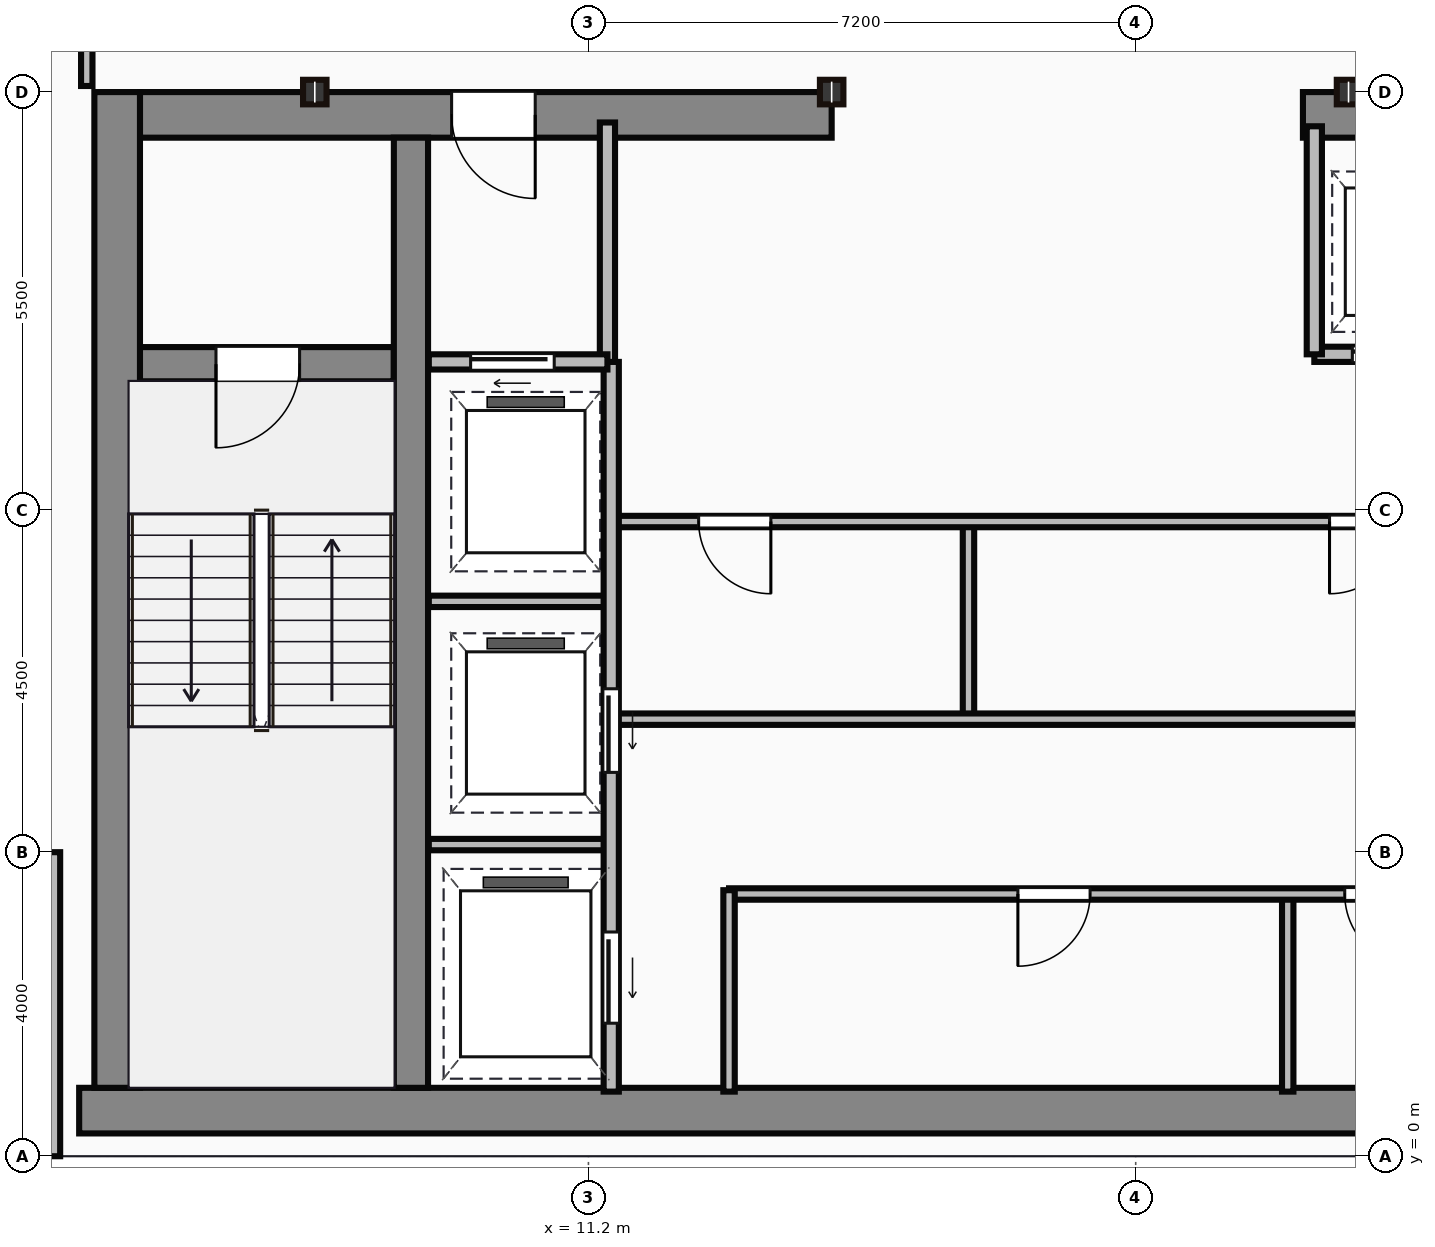
"""IFC4 building model, lengths in metres.
Left out: names, types, materials, properties, quantities, classifications, styles, units other than length and angle.
Written with IfcOpenShell. Run it as: python <this file> out.ifc"""

import sys

from ifc_helpers import new_model, si_unit, direction, frame, frame_2d, origin, origin_2d, place, context, subcontext, project, spatial, rectangle, i_section, extrude, source, transform, mapped, element, fill, save


model = new_model("IFC4")
c1 = context("Model", 3, precision=1e-05, world=origin(), true_north=direction((0.0, 1.0)))
c2 = subcontext(c1, "Body", "Model", "MODEL_VIEW")
j1 = project(units=[si_unit("LENGTHUNIT", "METRE"), si_unit("PLANEANGLEUNIT", "RADIAN")], contexts=[c1])
p1 = place(None, origin())
s1 = spatial("IfcSite", under=j1, at=p1, CompositionType="ELEMENT")
p2 = place(p1, origin())
s2 = spatial("IfcBuilding", under=s1, at=p2, CompositionType="ELEMENT")
p3 = place(p2, frame((0.0, 0.0, 199.55)))
s3 = spatial("IfcBuildingStorey", under=s2, at=p3, CompositionType="ELEMENT", Elevation=199.55)
m1 = source(origin(), c2, "Body", "SweptSolid", [
    extrude(rectangle(XDim=29.5, YDim=0.6, at=frame_2d((14.75, 0.0))), origin(), (0.0, 0.0, 1.0), 3.65),
])
p4 = place(p3, frame((4.5, 0.6, 0.0), z_axis=(0.0, 0.0, 1.0), x_axis=(1.0, 0.0, 0.0)))
e1 = element("IfcWall", 1, at=p4, inside=s3, PredefinedType="SHEAR", context=c2, shape_type="MappedRepresentation", body=[
    mapped(m1, transform((0.0, 0.0, 0.0))),
])
m2 = source(origin(), c2, "Body", "SweptSolid", [
    extrude(rectangle(XDim=13.1, YDim=0.6, at=frame_2d((6.55, 0.0))), origin(), (0.0, 0.0, 1.0), 3.65),
])
p5 = place(p3, frame((5.0, 0.9, 0.0), z_axis=(0.0, 0.0, 1.0), x_axis=(0.0, 1.0, 0.0)))
e2 = element("IfcWall", 2, at=p5, inside=s3, PredefinedType="SHEAR", context=c2, shape_type="MappedRepresentation", body=[
    mapped(m2, transform((0.0, 0.0, 0.0))),
])
m3 = source(origin(), c2, "Body", "SweptSolid", [
    extrude(rectangle(XDim=9.1, YDim=0.6, at=frame_2d((4.55, 0.0))), origin(), (0.0, 0.0, 1.0), 3.65),
])
p6 = place(p3, frame((5.3, 13.7, 0.0), z_axis=(0.0, 0.0, 1.0), x_axis=(1.0, 0.0, 0.0)))
e3 = element("IfcWall", 3, at=p6, inside=s3, PredefinedType="SHEAR", context=c2, shape_type="MappedRepresentation", body=[
    mapped(m3, transform((0.0, 0.0, 0.0))),
])
p7 = place(p6, frame((4.1, 0.0, 0.0)))
e4 = element("IfcOpeningElement", 4, at=p7, cuts=e3, PredefinedType="OPENING", context=c2, shape_type="SweptSolid", body=[
    extrude(rectangle(XDim=1.1, YDim=2.15, at=frame_2d((0.55, 1.075))), frame((0.0, 0.31, 0.0), z_axis=(0.0, -1.0, 0.0), x_axis=(1.0, 0.0, 0.0)), (0.0, 0.0, 1.0), 0.62),
])
m4 = source(origin(), c2, "Body", "SweptSolid", [
    extrude(rectangle(XDim=12.6, YDim=0.6, at=frame_2d((6.3, 0.0))), origin(), (0.0, 0.0, 1.0), 3.65),
])
p8 = place(p3, frame((20.6, 13.7, 0.0), z_axis=(0.0, 0.0, 1.0), x_axis=(1.0, 0.0, 0.0)))
e5 = element("IfcWall", 5, at=p8, inside=s3, PredefinedType="SHEAR", context=c2, shape_type="MappedRepresentation", body=[
    mapped(m4, transform((0.0, 0.0, 0.0))),
])
p9 = place(p8, frame((9.25, 0.0, 0.0)))
e6 = element("IfcOpeningElement", 6, at=p9, cuts=e5, PredefinedType="OPENING", context=c2, shape_type="SweptSolid", body=[
    extrude(rectangle(XDim=1.1, YDim=2.15, at=frame_2d((0.55, 1.075))), frame((0.0, 0.31, 0.0), z_axis=(0.0, -1.0, 0.0), x_axis=(1.0, 0.0, 0.0)), (0.0, 0.0, 1.0), 0.62),
])
m5 = source(origin(), c2, "Body", "SweptSolid", [
    extrude(rectangle(XDim=12.5, YDim=0.45, at=frame_2d((6.25, 0.0))), origin(), (0.0, 0.0, 1.0), 3.65),
])
p10 = place(p3, frame((8.865, 0.9, 0.0), z_axis=(0.0, 0.0, 1.0), x_axis=(0.0, 1.0, 0.0)))
e7 = element("IfcWall", 7, at=p10, inside=s3, PredefinedType="SHEAR", context=c2, shape_type="MappedRepresentation", body=[
    mapped(m5, transform((0.0, 0.0, 0.0))),
])
m6 = source(origin(), c2, "Body", "SweptSolid", [
    extrude(rectangle(XDim=3.39, YDim=0.45, at=frame_2d((1.695, 0.0))), origin(), (0.0, 0.0, 1.0), 3.65),
])
p11 = place(p3, frame((5.25, 10.42, 0.0), z_axis=(0.0, 0.0, 1.0), x_axis=(1.0, 0.0, 0.0)))
e8 = element("IfcWall", 8, at=p11, inside=s3, PredefinedType="SHEAR", context=c2, shape_type="MappedRepresentation", body=[
    mapped(m6, transform((0.0, 0.0, 0.0))),
])
p12 = place(p11, frame((1.05, 0.0, 0.0)))
e9 = element("IfcOpeningElement", 9, at=p12, cuts=e8, PredefinedType="OPENING", context=c2, shape_type="SweptSolid", body=[
    extrude(rectangle(XDim=1.1, YDim=2.15, at=frame_2d((0.55, 1.075))), frame((0.0, 0.235, 0.0), z_axis=(0.0, -1.0, 0.0), x_axis=(1.0, 0.0, 0.0)), (0.0, 0.0, 1.0), 0.47),
])
m7 = source(origin(), c2, "Body", "SweptSolid", [
    extrude(i_section(OverallWidth=0.309, OverallDepth=0.323, WebThickness=0.014, FlangeThickness=0.023, at=origin_2d()), origin(), (0.0, 0.0, 1.0), 3.65),
])
for number, where, z_axis, x_axis in (
    (10, (7.6, 14.0, 0.0), (0.0, 0.0, 1.0), (1.0, 0.0, 0.0)),
    (11, (14.4, 14.0, 0.0), (0.0, 0.0, 1.0), (1.0, 0.0, 0.0)),
    (12, (21.2, 14.0, 0.0), (0.0, 0.0, 1.0), (1.0, 0.0, 0.0)),
):
    element("IfcColumn", number, at=place(p3, frame(where, z_axis=z_axis, x_axis=x_axis)), inside=s3, PredefinedType="COLUMN", context=c2, shape_type="MappedRepresentation", body=[
        mapped(m7, transform((0.0, 0.0, 0.0))),
    ])
m8 = source(origin(), c2, "Body", "SweptSolid", [
    extrude(rectangle(XDim=4.0, YDim=0.25, at=frame_2d((2.0, 0.0))), origin(), (0.0, 0.0, 1.0), 3.4),
])
p13 = place(p3, frame((4.125, 4.0, 0.0), z_axis=(0.0, 0.0, 1.0), x_axis=(0.0, -1.0, 0.0)))
e13 = element("IfcWall", 13, at=p13, inside=s3, PredefinedType="STANDARD", context=c2, shape_type="MappedRepresentation", body=[
    mapped(m8, transform((0.0, 0.0, 0.0))),
])
m9 = source(origin(), c2, "Body", "SweptSolid", [
    extrude(rectangle(XDim=3.18, YDim=0.2, at=frame_2d((1.59, 0.0))), origin(), (0.0, 0.0, 1.0), 3.4),
])
p14 = place(p3, frame((11.45, 10.42, 0.0), z_axis=(0.0, 0.0, 1.0), x_axis=(0.0, 1.0, 0.0)))
e14 = element("IfcWall", 14, at=p14, inside=s3, PredefinedType="PARTITIONING", context=c2, shape_type="MappedRepresentation", body=[
    mapped(m9, transform((0.0, 0.0, 0.0))),
])
m10 = source(origin(), c2, "Body", "SweptSolid", [
    extrude(rectangle(XDim=2.35, YDim=0.2, at=frame_2d((1.175, 0.0))), origin(), (0.0, 0.0, 1.0), 3.4),
])
p15 = place(p3, frame((9.1, 10.45, 0.0), z_axis=(0.0, 0.0, 1.0), x_axis=(1.0, 0.0, 0.0)))
e15 = element("IfcWall", 15, at=p15, inside=s3, PredefinedType="PARTITIONING", context=c2, shape_type="MappedRepresentation", body=[
    mapped(m10, transform((0.0, 0.0, 0.0))),
])
p16 = place(p15, frame((0.55, 0.0, 0.0)))
e16 = element("IfcOpeningElement", 16, at=p16, cuts=e15, PredefinedType="OPENING", context=c2, shape_type="SweptSolid", body=[
    extrude(rectangle(XDim=1.1, YDim=2.15, at=frame_2d((0.55, 1.075))), frame((0.0, 0.11, 0.0), z_axis=(0.0, -1.0, 0.0), x_axis=(1.0, 0.0, 0.0)), (0.0, 0.0, 1.0), 0.22),
])
m11 = source(origin(), c2, "Body", "SweptSolid", [
    extrude(rectangle(XDim=9.6, YDim=0.2, at=frame_2d((4.8, 0.0))), origin(), (0.0, 0.0, 1.0), 3.4),
])
p17 = place(p3, frame((11.5, 0.85, 0.0), z_axis=(0.0, 0.0, 1.0), x_axis=(0.0, 1.0, 0.0)))
e17 = element("IfcWall", 17, at=p17, inside=s3, PredefinedType="PARTITIONING", context=c2, shape_type="MappedRepresentation", body=[
    mapped(m11, transform((0.0, 0.0, 0.0))),
])
p18 = place(p17, frame((4.2, 0.0, 0.0)))
e18 = element("IfcOpeningElement", 18, at=p18, cuts=e17, PredefinedType="OPENING", context=c2, shape_type="SweptSolid", body=[
    extrude(rectangle(XDim=1.1, YDim=2.15, at=frame_2d((0.55, 1.075))), frame((0.0, 0.11, 0.0), z_axis=(0.0, -1.0, 0.0), x_axis=(1.0, 0.0, 0.0)), (0.0, 0.0, 1.0), 0.22),
])
p19 = place(p17, frame((0.9, 0.0, 0.0)))
e19 = element("IfcOpeningElement", 19, at=p19, cuts=e17, PredefinedType="OPENING", context=c2, shape_type="SweptSolid", body=[
    extrude(rectangle(XDim=1.2, YDim=2.15, at=frame_2d((0.6, 1.075))), frame((0.0, 0.11, 0.0), z_axis=(0.0, -1.0, 0.0), x_axis=(1.0, 0.0, 0.0)), (0.0, 0.0, 1.0), 0.22),
])
m12 = source(origin(), c2, "Body", "SweptSolid", [
    extrude(rectangle(XDim=2.4, YDim=0.15, at=frame_2d((1.2, 0.0))), origin(), (0.0, 0.0, 1.0), 3.4),
])
for number, where, z_axis, x_axis in (
    (20, (9.1, 4.1, 0.0), (0.0, 0.0, 1.0), (1.0, 0.0, 0.0)),
    (21, (9.1, 7.3, 0.0), (0.0, 0.0, 1.0), (1.0, 0.0, 0.0)),
):
    element("IfcWall", number, at=place(p3, frame(where, z_axis=z_axis, x_axis=x_axis)), inside=s3, PredefinedType="PARTITIONING", context=c2, shape_type="MappedRepresentation", body=[
        mapped(m12, transform((0.0, 0.0, 0.0))),
    ])
m13 = source(origin(), c2, "Body", "SweptSolid", [
    extrude(rectangle(XDim=2.65, YDim=0.15, at=frame_2d((1.325, 0.0))), origin(), (0.0, 0.0, 1.0), 3.4),
])
p20 = place(p3, frame((13.05, 0.85, 0.0), z_axis=(0.0, 0.0, 1.0), x_axis=(0.0, 1.0, 0.0)))
e22 = element("IfcWall", 22, at=p20, inside=s3, PredefinedType="PARTITIONING", context=c2, shape_type="MappedRepresentation", body=[
    mapped(m13, transform((0.0, 0.0, 0.0))),
])
m14 = source(origin(), c2, "Body", "SweptSolid", [
    extrude(rectangle(XDim=10.35, YDim=0.15, at=frame_2d((5.175, 0.0))), origin(), (0.0, 0.0, 1.0), 3.4),
])
p21 = place(p3, frame((13.05, 3.45, 0.0), z_axis=(0.0, 0.0, 1.0), x_axis=(1.0, 0.0, 0.0)))
e23 = element("IfcWall", 23, at=p21, inside=s3, PredefinedType="PARTITIONING", context=c2, shape_type="MappedRepresentation", body=[
    mapped(m14, transform((0.0, 0.0, 0.0))),
])
p22 = place(p21, frame((3.8, 0.0, 0.0)))
e24 = element("IfcOpeningElement", 24, at=p22, cuts=e23, PredefinedType="OPENING", context=c2, shape_type="SweptSolid", body=[
    extrude(rectangle(XDim=0.95, YDim=2.15, at=frame_2d((0.475, 1.075))), frame((0.0, 0.085, 0.0), z_axis=(0.0, -1.0, 0.0), x_axis=(1.0, 0.0, 0.0)), (0.0, 0.0, 1.0), 0.17),
])
p23 = place(p21, frame((8.1, 0.0, 0.0)))
e25 = element("IfcOpeningElement", 25, at=p23, cuts=e23, PredefinedType="OPENING", context=c2, shape_type="SweptSolid", body=[
    extrude(rectangle(XDim=0.95, YDim=2.15, at=frame_2d((0.475, 1.075))), frame((0.0, 0.085, 0.0), z_axis=(0.0, -1.0, 0.0), x_axis=(1.0, 0.0, 0.0)), (0.0, 0.0, 1.0), 0.17),
])
m15 = source(origin(), c2, "Body", "SweptSolid", [
    extrude(rectangle(XDim=2.6, YDim=0.15, at=frame_2d((1.3, 0.0))), origin(), (0.0, 0.0, 1.0), 3.4),
])
p24 = place(p3, frame((20.4, 0.85, 0.0), z_axis=(0.0, 0.0, 1.0), x_axis=(0.0, 1.0, 0.0)))
e26 = element("IfcWall", 26, at=p24, inside=s3, PredefinedType="PARTITIONING", context=c2, shape_type="MappedRepresentation", body=[
    mapped(m15, transform((0.0, 0.0, 0.0))),
])
m16 = source(origin(), c2, "Body", "SweptSolid", [
    extrude(rectangle(XDim=11.85, YDim=0.15, at=frame_2d((5.925, 0.0))), origin(), (0.0, 0.0, 1.0), 3.4),
])
p25 = place(p3, frame((11.55, 5.75, 0.0), z_axis=(0.0, 0.0, 1.0), x_axis=(1.0, 0.0, 0.0)))
e27 = element("IfcWall", 27, at=p25, inside=s3, PredefinedType="PARTITIONING", context=c2, shape_type="MappedRepresentation", body=[
    mapped(m16, transform((0.0, 0.0, 0.0))),
])
p26 = place(p3, frame((11.55, 8.35, 0.0), z_axis=(0.0, 0.0, 1.0), x_axis=(1.0, 0.0, 0.0)))
e28 = element("IfcWall", 28, at=p26, inside=s3, PredefinedType="PARTITIONING", context=c2, shape_type="MappedRepresentation", body=[
    mapped(m16, transform((0.0, 0.0, 0.0))),
])
p27 = place(p26, frame((1.1, 0.0, 0.0)))
e29 = element("IfcOpeningElement", 29, at=p27, cuts=e28, PredefinedType="OPENING", context=c2, shape_type="SweptSolid", body=[
    extrude(rectangle(XDim=0.95, YDim=2.15, at=frame_2d((0.475, 1.075))), frame((0.0, 0.085, 0.0), z_axis=(0.0, -1.0, 0.0), x_axis=(1.0, 0.0, 0.0)), (0.0, 0.0, 1.0), 0.17),
])
p28 = place(p26, frame((9.4, 0.0, 0.0)))
e30 = element("IfcOpeningElement", 30, at=p28, cuts=e28, PredefinedType="OPENING", context=c2, shape_type="SweptSolid", body=[
    extrude(rectangle(XDim=0.95, YDim=2.15, at=frame_2d((0.475, 1.075))), frame((0.0, 0.085, 0.0), z_axis=(0.0, -1.0, 0.0), x_axis=(1.0, 0.0, 0.0)), (0.0, 0.0, 1.0), 0.17),
])
m17 = source(origin(), c2, "Body", "SweptSolid", [
    extrude(rectangle(XDim=2.5, YDim=0.15, at=frame_2d((1.25, 0.0))), origin(), (0.0, 0.0, 1.0), 3.4),
])
p29 = place(p3, frame((16.2, 5.8, 0.0), z_axis=(0.0, 0.0, 1.0), x_axis=(0.0, 1.0, 0.0)))
e31 = element("IfcWall", 31, at=p29, inside=s3, PredefinedType="PARTITIONING", context=c2, shape_type="MappedRepresentation", body=[
    mapped(m17, transform((0.0, 0.0, 0.0))),
])
m18 = source(origin(), c2, "Body", "SweptSolid", [
    extrude(rectangle(XDim=8.8, YDim=0.2, at=frame_2d((4.4, 0.0))), origin(), (0.0, 0.0, 1.0), 3.4),
])
p30 = place(p3, frame((20.75, 10.55, 0.0), z_axis=(0.0, 0.0, 1.0), x_axis=(1.0, 0.0, 0.0)))
e32 = element("IfcWall", 32, at=p30, inside=s3, PredefinedType="PARTITIONING", context=c2, shape_type="MappedRepresentation", body=[
    mapped(m18, transform((0.0, 0.0, 0.0))),
])
p31 = place(p30, frame((0.5, 0.0, 0.0)))
e33 = element("IfcOpeningElement", 33, at=p31, cuts=e32, PredefinedType="OPENING", context=c2, shape_type="SweptSolid", body=[
    extrude(rectangle(XDim=1.05, YDim=2.15, at=frame_2d((0.525, 1.075))), frame((0.0, 0.11, 0.0), z_axis=(0.0, -1.0, 0.0), x_axis=(1.0, 0.0, 0.0)), (0.0, 0.0, 1.0), 0.22),
])
p32 = place(p30, frame((2.6, 0.0, 0.0)))
e34 = element("IfcOpeningElement", 34, at=p32, cuts=e32, PredefinedType="OPENING", context=c2, shape_type="SweptSolid", body=[
    extrude(rectangle(XDim=1.05, YDim=2.15, at=frame_2d((0.525, 1.075))), frame((0.0, 0.11, 0.0), z_axis=(0.0, -1.0, 0.0), x_axis=(1.0, 0.0, 0.0)), (0.0, 0.0, 1.0), 0.22),
])
p33 = place(p30, frame((4.7, 0.0, 0.0)))
e35 = element("IfcOpeningElement", 35, at=p33, cuts=e32, PredefinedType="OPENING", context=c2, shape_type="SweptSolid", body=[
    extrude(rectangle(XDim=1.05, YDim=2.15, at=frame_2d((0.525, 1.075))), frame((0.0, 0.11, 0.0), z_axis=(0.0, -1.0, 0.0), x_axis=(1.0, 0.0, 0.0)), (0.0, 0.0, 1.0), 0.22),
])
p34 = place(p30, frame((6.8, 0.0, 0.0)))
e36 = element("IfcOpeningElement", 36, at=p34, cuts=e32, PredefinedType="OPENING", context=c2, shape_type="SweptSolid", body=[
    extrude(rectangle(XDim=1.05, YDim=2.15, at=frame_2d((0.525, 1.075))), frame((0.0, 0.11, 0.0), z_axis=(0.0, -1.0, 0.0), x_axis=(1.0, 0.0, 0.0)), (0.0, 0.0, 1.0), 0.22),
])
m19 = source(origin(), c2, "Body", "SweptSolid", [
    extrude(rectangle(XDim=3.0, YDim=0.2, at=frame_2d((1.5, 0.0))), origin(), (0.0, 0.0, 1.0), 3.4),
])
p35 = place(p3, frame((20.75, 10.55, 0.0), z_axis=(0.0, 0.0, 1.0), x_axis=(0.0, 1.0, 0.0)))
e37 = element("IfcWall", 37, at=p35, inside=s3, PredefinedType="PARTITIONING", context=c2, shape_type="MappedRepresentation", body=[
    mapped(m19, transform((0.0, 0.0, 0.0))),
])
m20 = source(origin(), c2, "Body", "SweptSolid", [
    extrude(rectangle(XDim=2.12, YDim=0.15, at=frame_2d((1.06, 0.0))), origin(), (0.0, 0.0, 1.0), 3.4),
])
p36 = place(p3, frame((4.6, 14.08, 0.0), z_axis=(0.0, 0.0, 1.0), x_axis=(0.0, 1.0, 0.0)))
e38 = element("IfcWall", 38, at=p36, inside=s3, PredefinedType="PARTITIONING", context=c2, shape_type="MappedRepresentation", body=[
    mapped(m20, transform((0.0, 0.0, 0.0))),
])
m21 = source(origin(), c2, "Body", "SweptSolid", [
    extrude(rectangle(XDim=1.1, YDim=2.15, at=frame_2d((0.55, 1.075))), frame((0.0, 0.025, 0.0), z_axis=(0.0, -1.0, 0.0), x_axis=(1.0, 0.0, 0.0)), (0.0, 0.0, 1.0), 0.05),
])
p37 = place(p12, frame((1.1, 0.0, 0.0), z_axis=(0.0, 0.0, 1.0), x_axis=(-1.0, 0.0, 0.0)))
e39 = element("IfcDoor", 39, at=p37, inside=s3, OperationType="SINGLE_SWING_LEFT", PredefinedType="DOOR", context=c2, shape_type="MappedRepresentation", body=[
    mapped(m21, transform((0.0, 0.0, 0.0))),
])
fill(e9, e39)
p38 = place(p7, origin())
e40 = element("IfcDoor", 40, at=p38, inside=s3, OperationType="SINGLE_SWING_RIGHT", PredefinedType="DOOR", context=c2, shape_type="MappedRepresentation", body=[
    mapped(m21, transform((0.0, 0.0, 0.0))),
])
fill(e4, e40)
p39 = place(p16, origin())
e41 = element("IfcDoor", 41, at=p39, inside=s3, OperationType="SLIDING_TO_LEFT", PredefinedType="DOOR", context=c2, shape_type="MappedRepresentation", body=[
    mapped(m21, transform((0.0, 0.0, 0.0))),
])
fill(e16, e41)
p40 = place(p18, frame((1.1, 0.0, 0.0), z_axis=(0.0, 0.0, 1.0), x_axis=(-1.0, 0.0, 0.0)))
e42 = element("IfcDoor", 42, at=p40, inside=s3, OperationType="SLIDING_TO_LEFT", PredefinedType="DOOR", context=c2, shape_type="MappedRepresentation", body=[
    mapped(m21, transform((0.0, 0.0, 0.0))),
])
fill(e18, e42)
m22 = source(origin(), c2, "Body", "SweptSolid", [
    extrude(rectangle(XDim=1.2, YDim=2.15, at=frame_2d((0.6, 1.075))), frame((0.0, 0.025, 0.0), z_axis=(0.0, -1.0, 0.0), x_axis=(1.0, 0.0, 0.0)), (0.0, 0.0, 1.0), 0.05),
])
p41 = place(p19, frame((1.2, 0.0, 0.0), z_axis=(0.0, 0.0, 1.0), x_axis=(-1.0, 0.0, 0.0)))
e43 = element("IfcDoor", 43, at=p41, inside=s3, OperationType="SLIDING_TO_LEFT", PredefinedType="DOOR", context=c2, shape_type="MappedRepresentation", body=[
    mapped(m22, transform((0.0, 0.0, 0.0))),
])
fill(e19, e43)
m23 = source(origin(), c2, "Body", "SweptSolid", [
    extrude(rectangle(XDim=0.95, YDim=2.15, at=frame_2d((0.475, 1.075))), frame((0.0, 0.025, 0.0), z_axis=(0.0, -1.0, 0.0), x_axis=(1.0, 0.0, 0.0)), (0.0, 0.0, 1.0), 0.05),
])
p42 = place(p22, origin())
e44 = element("IfcDoor", 44, at=p42, inside=s3, OperationType="SINGLE_SWING_LEFT", PredefinedType="DOOR", context=c2, shape_type="MappedRepresentation", body=[
    mapped(m23, transform((0.0, 0.0, 0.0))),
])
fill(e24, e44)
p43 = place(p23, origin())
e45 = element("IfcDoor", 45, at=p43, inside=s3, OperationType="SINGLE_SWING_RIGHT", PredefinedType="DOOR", context=c2, shape_type="MappedRepresentation", body=[
    mapped(m23, transform((0.0, 0.0, 0.0))),
])
fill(e25, e45)
p44 = place(p27, origin())
e46 = element("IfcDoor", 46, at=p44, inside=s3, OperationType="SINGLE_SWING_RIGHT", PredefinedType="DOOR", context=c2, shape_type="MappedRepresentation", body=[
    mapped(m23, transform((0.0, 0.0, 0.0))),
])
fill(e29, e46)
p45 = place(p28, origin())
e47 = element("IfcDoor", 47, at=p45, inside=s3, OperationType="SINGLE_SWING_LEFT", PredefinedType="DOOR", context=c2, shape_type="MappedRepresentation", body=[
    mapped(m23, transform((0.0, 0.0, 0.0))),
])
fill(e30, e47)
m24 = source(origin(), c2, "Body", "SweptSolid", [
    extrude(rectangle(XDim=1.05, YDim=2.15, at=frame_2d((0.525, 1.075))), frame((0.0, 0.025, 0.0), z_axis=(0.0, -1.0, 0.0), x_axis=(1.0, 0.0, 0.0)), (0.0, 0.0, 1.0), 0.05),
])
p46 = place(p31, frame((1.05, 0.0, 0.0), z_axis=(0.0, 0.0, 1.0), x_axis=(-1.0, 0.0, 0.0)))
e48 = element("IfcDoor", 48, at=p46, inside=s3, OperationType="SLIDING_TO_LEFT", PredefinedType="DOOR", context=c2, shape_type="MappedRepresentation", body=[
    mapped(m24, transform((0.0, 0.0, 0.0))),
])
fill(e33, e48)
save(model, sys.argv[1])
